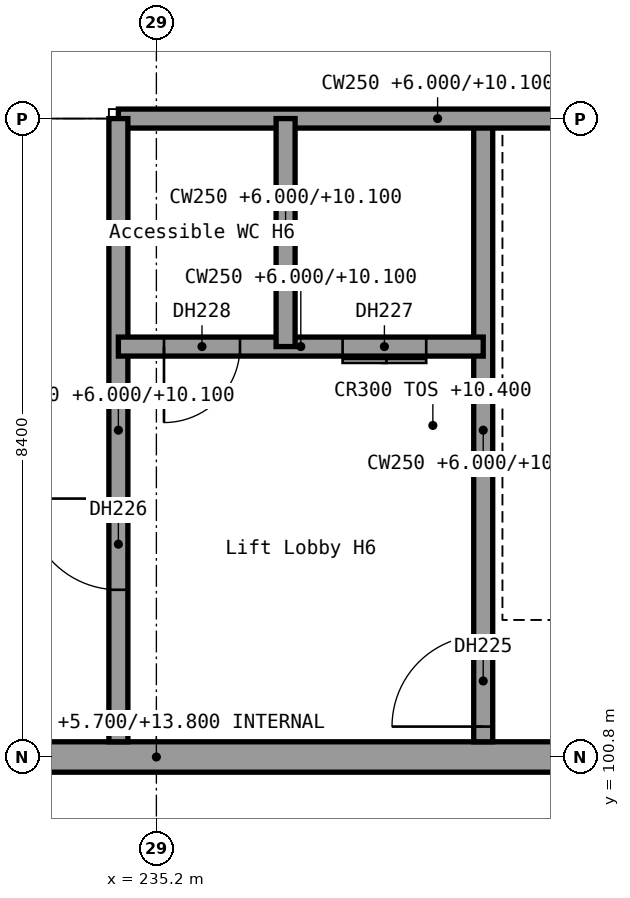
"""IFC4 building model, lengths in metres.
Left out: names, types, materials, properties, quantities, classifications, styles, units other than length and angle.
Written with IfcOpenShell. Run it as: python <this file> out.ifc"""

import sys

from ifc_helpers import new_model, si_unit, direction, frame, frame_2d, origin, place, context, subcontext, project, spatial, rectangle, extrude, element, fill, save


model = new_model("IFC4")
c1 = context("Model", 3, precision=1e-05, world=origin(), true_north=direction((0.0, 1.0)))
c2 = subcontext(c1, "Body", "Model", "MODEL_VIEW")
j1 = project(units=[si_unit("LENGTHUNIT", "METRE"), si_unit("PLANEANGLEUNIT", "RADIAN")], contexts=[c1])
p1 = place(None, origin())
s1 = spatial("IfcSite", under=j1, at=p1, CompositionType="ELEMENT")
p2 = place(p1, origin())
s2 = spatial("IfcBuilding", under=s1, at=p2, CompositionType="ELEMENT")
p3 = place(p2, frame((0.0, 0.0, 6.0)))
s3 = spatial("IfcBuildingStorey", under=s2, at=p3, CompositionType="ELEMENT", Elevation=6.0)
p4 = place(p3, frame((227.3, 100.8, -0.3), z_axis=(0.0, 0.0, 1.0), x_axis=(1.0, 0.0, 0.0)))
e1 = element("IfcWall", 1, at=p4, inside=s3, PredefinedType="STANDARD", context=c2, shape_type="SweptSolid", body=[
    extrude(rectangle(XDim=15.8, YDim=0.4, at=frame_2d((7.9, 0.0))), origin(), (0.0, 0.0, 1.0), 8.1),
])
p5 = place(p3, frame((239.5, 101.0, 0.0), z_axis=(0.0, 0.0, 1.0), x_axis=(0.0, 1.0, 0.0)))
e2 = element("IfcWall", 2, at=p5, inside=s3, PredefinedType="SHEAR", context=c2, shape_type="SweptSolid", body=[
    extrude(rectangle(XDim=8.2, YDim=0.25, at=frame_2d((4.1, 0.0))), origin(), (0.0, 0.0, 1.0), 4.1),
])
p6 = place(p5, frame((0.2, 0.0, 0.0)))
e3 = element("IfcOpeningElement", 3, at=p6, cuts=e2, PredefinedType="OPENING", context=c2, shape_type="SweptSolid", body=[
    extrude(rectangle(XDim=1.2, YDim=2.1, at=frame_2d((0.6, 1.05))), frame((0.0, 0.125, 0.0), z_axis=(0.0, -1.0, 0.0), x_axis=(1.0, 0.0, 0.0)), (0.0, 0.0, 1.0), 0.25),
])
p7 = place(p3, frame((243.1, 109.2, 0.0), z_axis=(0.0, 0.0, 1.0), x_axis=(-1.0, 0.0, 0.0)))
e4 = element("IfcWall", 4, at=p7, inside=s3, PredefinedType="SHEAR", context=c2, shape_type="SweptSolid", body=[
    extrude(rectangle(XDim=8.4, YDim=0.25, at=frame_2d((4.2, 0.0))), origin(), (0.0, 0.0, 1.0), 4.1),
])
p8 = place(p3, frame((234.7, 101.0, 0.0), z_axis=(0.0, 0.0, 1.0), x_axis=(0.0, 1.0, 0.0)))
e5 = element("IfcWall", 5, at=p8, inside=s3, PredefinedType="SHEAR", context=c2, shape_type="SweptSolid", body=[
    extrude(rectangle(XDim=8.2, YDim=0.25, at=frame_2d((4.1, 0.0))), origin(), (0.0, 0.0, 1.0), 4.1),
])
p9 = place(p8, frame((2.0, 0.0, 0.0)))
e6 = element("IfcOpeningElement", 6, at=p9, cuts=e5, PredefinedType="OPENING", context=c2, shape_type="SweptSolid", body=[
    extrude(rectangle(XDim=1.2, YDim=2.1, at=frame_2d((0.6, 1.05))), frame((0.0, 0.125, 0.0), z_axis=(0.0, -1.0, 0.0), x_axis=(1.0, 0.0, 0.0)), (0.0, 0.0, 1.0), 0.25),
])
p10 = place(p3, frame((239.5, 106.2, 0.0), z_axis=(0.0, 0.0, 1.0), x_axis=(-1.0, 0.0, 0.0)))
e7 = element("IfcWall", 7, at=p10, inside=s3, PredefinedType="SHEAR", context=c2, shape_type="SweptSolid", body=[
    extrude(rectangle(XDim=4.8, YDim=0.25, at=frame_2d((2.4, 0.0))), origin(), (0.0, 0.0, 1.0), 4.1),
])
p11 = place(p10, frame((0.75, 0.0, 0.0)))
e8 = element("IfcOpeningElement", 8, at=p11, cuts=e7, PredefinedType="OPENING", context=c2, shape_type="SweptSolid", body=[
    extrude(rectangle(XDim=1.1, YDim=2.1, at=frame_2d((0.55, 1.05))), frame((0.0, 0.125, 0.0), z_axis=(0.0, -1.0, 0.0), x_axis=(1.0, 0.0, 0.0)), (0.0, 0.0, 1.0), 0.25),
])
p12 = place(p10, frame((3.2, 0.0, 0.0)))
e9 = element("IfcOpeningElement", 9, at=p12, cuts=e7, PredefinedType="OPENING", context=c2, shape_type="SweptSolid", body=[
    extrude(rectangle(XDim=1.0, YDim=2.1, at=frame_2d((0.5, 1.05))), frame((0.0, 0.125, 0.0), z_axis=(0.0, -1.0, 0.0), x_axis=(1.0, 0.0, 0.0)), (0.0, 0.0, 1.0), 0.25),
])
p13 = place(p3, frame((236.9, 106.2, 0.0), z_axis=(0.0, 0.0, 1.0), x_axis=(0.0, 1.0, 0.0)))
e10 = element("IfcWall", 10, at=p13, inside=s3, PredefinedType="SHEAR", context=c2, shape_type="SweptSolid", body=[
    extrude(rectangle(XDim=3.0, YDim=0.25, at=frame_2d((1.5, 0.0))), origin(), (0.0, 0.0, 1.0), 4.1),
])
p14 = place(p6, origin())
e11 = element("IfcDoor", 11, at=p14, inside=s3, OperationType="SINGLE_SWING_LEFT", PredefinedType="DOOR", context=c2, shape_type="SweptSolid", body=[
    extrude(rectangle(XDim=1.2, YDim=2.1, at=frame_2d((0.6, 1.05))), frame((0.0, 0.025, 0.0), z_axis=(0.0, -1.0, 0.0), x_axis=(1.0, 0.0, 0.0)), (0.0, 0.0, 1.0), 0.05),
])
fill(e3, e11)
p15 = place(p9, origin())
e12 = element("IfcDoor", 12, at=p15, inside=s3, OperationType="SINGLE_SWING_LEFT", PredefinedType="DOOR", context=c2, shape_type="SweptSolid", body=[
    extrude(rectangle(XDim=1.2, YDim=2.1, at=frame_2d((0.6, 1.05))), frame((0.0, 0.025, 0.0), z_axis=(0.0, -1.0, 0.0), x_axis=(1.0, 0.0, 0.0)), (0.0, 0.0, 1.0), 0.05),
])
fill(e6, e12)
p16 = place(p11, origin())
e13 = element("IfcDoor", 13, at=p16, inside=s3, OperationType="DOUBLE_DOOR_SLIDING", PredefinedType="DOOR", context=c2, shape_type="SweptSolid", body=[
    extrude(rectangle(XDim=1.1, YDim=2.1, at=frame_2d((0.55, 1.05))), frame((0.0, 0.025, 0.0), z_axis=(0.0, -1.0, 0.0), x_axis=(1.0, 0.0, 0.0)), (0.0, 0.0, 1.0), 0.05),
])
fill(e8, e13)
p17 = place(p12, origin())
e14 = element("IfcDoor", 14, at=p17, inside=s3, OperationType="SINGLE_SWING_RIGHT", PredefinedType="DOOR", context=c2, shape_type="SweptSolid", body=[
    extrude(rectangle(XDim=1.0, YDim=2.1, at=frame_2d((0.5, 1.05))), frame((0.0, 0.025, 0.0), z_axis=(0.0, -1.0, 0.0), x_axis=(1.0, 0.0, 0.0)), (0.0, 0.0, 1.0), 0.05),
])
fill(e9, e14)
save(model, sys.argv[1])
